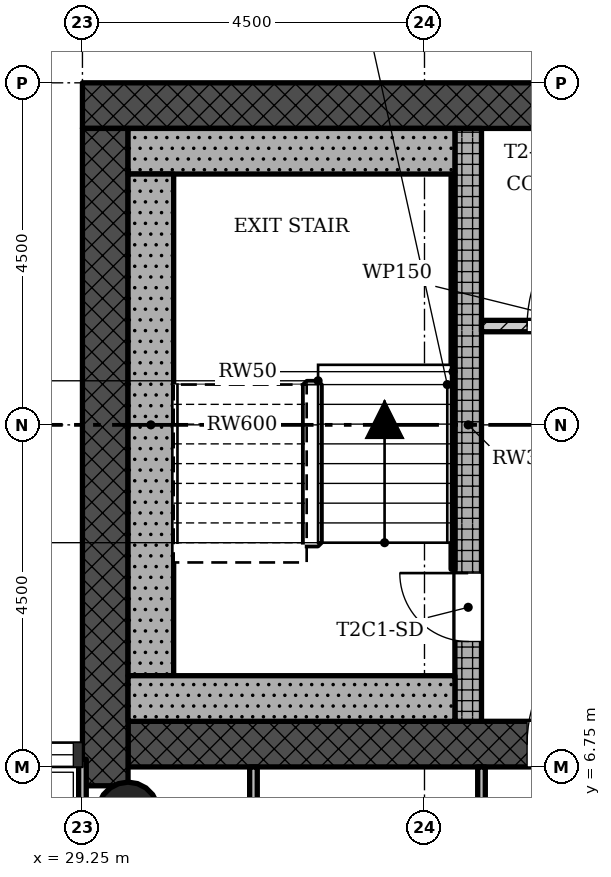
"""IFC4 building model, lengths in metres.
Left out: names, types, materials, properties, quantities, classifications, styles, units other than length and angle.
Written with IfcOpenShell. Run it as: python <this file> out.ifc"""

import sys

from ifc_helpers import new_model, si_unit, direction, frame, frame_2d, origin, origin_2d, place, context, subcontext, project, spatial, rectangle, hollow_circle, extrude, element, fill, save


model = new_model("IFC4")
c1 = context("Model", 3, precision=1e-05, world=origin(), true_north=direction((0.0, 1.0)))
c2 = subcontext(c1, "Body", "Model", "MODEL_VIEW")
j1 = project(units=[si_unit("LENGTHUNIT", "METRE"), si_unit("PLANEANGLEUNIT", "RADIAN")], contexts=[c1])
p1 = place(None, origin())
s1 = spatial("IfcSite", under=j1, at=p1, CompositionType="ELEMENT")
p2 = place(p1, origin())
s2 = spatial("IfcBuilding", under=s1, at=p2, CompositionType="ELEMENT")
p3 = place(p2, frame((0.0, 0.0, 209.6)))
s3 = spatial("IfcBuildingStorey", under=s2, at=p3, CompositionType="ELEMENT", Elevation=209.6)
p4 = place(p3, frame((29.85, 7.05, 0.0), z_axis=(0.0, 0.0, 1.0), x_axis=(1.0, 0.0, 0.0)))
e1 = element("IfcWall", 1, at=p4, inside=s3, PredefinedType="SHEAR", context=c2, shape_type="SweptSolid", body=[
    extrude(rectangle(XDim=12.9, YDim=0.6, at=frame_2d((6.45, 0.0))), origin(), (0.0, 0.0, 1.0), 3.4),
])
p5 = place(p4, frame((5.25, 0.0, 0.0)))
e2 = element("IfcOpeningElement", 2, at=p5, cuts=e1, PredefinedType="OPENING", context=c2, shape_type="SweptSolid", body=[
    extrude(rectangle(XDim=1.8, YDim=2.1, at=frame_2d((0.9, 1.05))), frame((0.0, 0.31, 0.0), z_axis=(0.0, -1.0, 0.0), x_axis=(1.0, 0.0, 0.0)), (0.0, 0.0, 1.0), 0.62),
])
p6 = place(p3, frame((42.15, 15.45, 0.0), z_axis=(0.0, 0.0, 1.0), x_axis=(-1.0, 0.0, 0.0)))
e3 = element("IfcWall", 3, at=p6, inside=s3, PredefinedType="SHEAR", context=c2, shape_type="SweptSolid", body=[
    extrude(rectangle(XDim=12.9, YDim=0.6, at=frame_2d((6.45, 0.0))), origin(), (0.0, 0.0, 1.0), 3.4),
])
p7 = place(p6, frame((5.7, 0.0, 0.45)))
e4 = element("IfcOpeningElement", 4, at=p7, cuts=e3, PredefinedType="OPENING", context=c2, shape_type="SweptSolid", body=[
    extrude(rectangle(XDim=0.9, YDim=2.4, at=frame_2d((0.45, 1.2))), frame((0.0, 0.31, 0.0), z_axis=(0.0, -1.0, 0.0), x_axis=(1.0, 0.0, 0.0)), (0.0, 0.0, 1.0), 0.62),
])
p8 = place(p3, frame((29.55, 15.15, 0.0), z_axis=(0.0, 0.0, 1.0), x_axis=(0.0, -1.0, 0.0)))
e5 = element("IfcWall", 5, at=p8, inside=s3, PredefinedType="SHEAR", context=c2, shape_type="SweptSolid", body=[
    extrude(rectangle(XDim=8.648, YDim=0.6, at=frame_2d((4.324, 0.0))), origin(), (0.0, 0.0, 1.0), 3.4),
])
p9 = place(p3, frame((34.325, 7.35, 0.0), z_axis=(0.0, 0.0, 1.0), x_axis=(0.0, 1.0, 0.0)))
e6 = element("IfcWall", 6, at=p9, inside=s3, PredefinedType="SHEAR", context=c2, shape_type="SweptSolid", body=[
    extrude(rectangle(XDim=7.8, YDim=0.35, at=frame_2d((3.9, 0.0))), origin(), (0.0, 0.0, 1.0), 3.4),
])
p10 = place(p9, frame((1.05, 0.0, 0.0)))
e7 = element("IfcOpeningElement", 7, at=p10, cuts=e6, PredefinedType="OPENING", context=c2, shape_type="SweptSolid", body=[
    extrude(rectangle(XDim=0.9, YDim=2.1, at=frame_2d((0.45, 1.05))), frame((0.0, 0.185, 0.0), z_axis=(0.0, -1.0, 0.0), x_axis=(1.0, 0.0, 0.0)), (0.0, 0.0, 1.0), 0.37),
])
p11 = place(p3, frame((29.85, 6.15, 0.0), z_axis=(0.0, 0.0, 1.0), x_axis=(1.0, 0.0, 0.0)))
e8 = element("IfcColumn", 8, at=p11, inside=s3, PredefinedType="COLUMN", context=c2, shape_type="SweptSolid", body=[
    extrude(hollow_circle(Radius=0.4, WallThickness=0.028, at=origin_2d()), origin(), (0.0, 0.0, 1.0), 3.4),
])
p12 = place(p3, frame((37.5, 12.55, 0.0), z_axis=(0.0, 0.0, 1.0), x_axis=(-1.0, 0.0, 0.0)))
e9 = element("IfcWall", 9, at=p12, inside=s3, PredefinedType="PARTITIONING", context=c2, shape_type="SweptSolid", body=[
    extrude(rectangle(XDim=3.0, YDim=0.15, at=frame_2d((1.5, 0.0))), origin(), (0.0, 0.0, 1.0), 3.0),
])
p13 = place(p12, frame((0.6, 0.0, 0.0)))
e10 = element("IfcOpeningElement", 10, at=p13, cuts=e9, PredefinedType="OPENING", context=c2, shape_type="SweptSolid", body=[
    extrude(rectangle(XDim=1.8, YDim=2.1, at=frame_2d((0.9, 1.05))), frame((0.0, 0.085, 0.0), z_axis=(0.0, -1.0, 0.0), x_axis=(1.0, 0.0, 0.0)), (0.0, 0.0, 1.0), 0.17),
])
p14 = place(p3, frame((34.5, 4.5, 0.0), z_axis=(0.0, 0.0, 1.0), x_axis=(0.0, 1.0, 0.0)))
e11 = element("IfcWall", 11, at=p14, inside=s3, PredefinedType="PARTITIONING", context=c2, shape_type="SweptSolid", body=[
    extrude(rectangle(XDim=2.25, YDim=0.1, at=frame_2d((1.125, 0.0))), origin(), (0.0, 0.0, 1.0), 3.0),
])
p15 = place(p3, frame((31.5, 0.9, 0.0), z_axis=(0.0, 0.0, 1.0), x_axis=(0.0, 1.0, 0.0)))
e12 = element("IfcWall", 12, at=p15, inside=s3, PredefinedType="PARTITIONING", context=c2, shape_type="SweptSolid", body=[
    extrude(rectangle(XDim=5.85, YDim=0.1, at=frame_2d((2.925, 0.0))), origin(), (0.0, 0.0, 1.0), 3.0),
])
p16 = place(p15, frame((1.35, 0.0, 0.0)))
e13 = element("IfcOpeningElement", 13, at=p16, cuts=e12, PredefinedType="OPENING", context=c2, shape_type="SweptSolid", body=[
    extrude(rectangle(XDim=0.9, YDim=2.1, at=frame_2d((0.45, 1.05))), frame((0.0, 0.06, 0.0), z_axis=(0.0, -1.0, 0.0), x_axis=(1.0, 0.0, 0.0)), (0.0, 0.0, 1.0), 0.12),
])
p17 = place(p3, frame((29.25, 0.9, 0.0), z_axis=(0.0, 0.0, 1.0), x_axis=(0.0, 1.0, 0.0)))
e14 = element("IfcWall", 14, at=p17, inside=s3, PredefinedType="PARTITIONING", context=c2, shape_type="SweptSolid", body=[
    extrude(rectangle(XDim=5.95, YDim=0.1, at=frame_2d((2.975, 0.0))), origin(), (0.0, 0.0, 1.0), 3.0),
])
p18 = place(p3, frame((34.15, 14.85, 0.0), z_axis=(0.0, 0.0, 1.0), x_axis=(-1.0, 0.0, 0.0)))
e15 = element("IfcWall", 15, at=p18, inside=s3, PredefinedType="SHEAR", context=c2, shape_type="SweptSolid", body=[
    extrude(rectangle(XDim=4.3, YDim=0.6, at=frame_2d((2.15, 0.0))), origin(), (0.0, 0.0, 1.0), 3.4),
])
p19 = place(p3, frame((30.15, 7.95, 0.0), z_axis=(0.0, 0.0, 1.0), x_axis=(0.0, 1.0, 0.0)))
e16 = element("IfcWall", 16, at=p19, inside=s3, PredefinedType="SHEAR", context=c2, shape_type="SweptSolid", body=[
    extrude(rectangle(XDim=6.6, YDim=0.6, at=frame_2d((3.3, 0.0))), origin(), (0.0, 0.0, 1.0), 3.4),
])
p20 = place(p3, frame((34.15, 7.65, 0.0), z_axis=(0.0, 0.0, 1.0), x_axis=(-1.0, 0.0, 0.0)))
e17 = element("IfcWall", 17, at=p20, inside=s3, PredefinedType="SHEAR", context=c2, shape_type="SweptSolid", body=[
    extrude(rectangle(XDim=4.3, YDim=0.6, at=frame_2d((2.15, 0.0))), origin(), (0.0, 0.0, 1.0), 3.4),
])
p21 = place(p3, frame((34.125, 9.35, 0.0), z_axis=(0.0, 0.0, 1.0), x_axis=(0.0, 1.0, 0.0)))
e18 = element("IfcWall", 18, at=p21, inside=s3, PredefinedType="SHEAR", context=c2, shape_type="SweptSolid", body=[
    extrude(rectangle(XDim=5.2, YDim=0.05, at=frame_2d((2.6, 0.0))), origin(), (0.0, 0.0, 1.0), 3.4),
])
p22 = place(p13, origin())
e19 = element("IfcDoor", 19, at=p22, inside=s3, OperationType="SINGLE_SWING_LEFT", PredefinedType="DOOR", context=c2, shape_type="SweptSolid", body=[
    extrude(rectangle(XDim=1.8, YDim=2.1, at=frame_2d((0.9, 1.05))), frame((0.0, 0.025, 0.0), z_axis=(0.0, -1.0, 0.0), x_axis=(1.0, 0.0, 0.0)), (0.0, 0.0, 1.0), 0.05),
])
fill(e10, e19)
p23 = place(p10, origin())
e20 = element("IfcDoor", 20, at=p23, inside=s3, OperationType="SINGLE_SWING_LEFT", PredefinedType="DOOR", context=c2, shape_type="SweptSolid", body=[
    extrude(rectangle(XDim=0.9, YDim=2.1, at=frame_2d((0.45, 1.05))), frame((0.0, 0.025, 0.0), z_axis=(0.0, -1.0, 0.0), x_axis=(1.0, 0.0, 0.0)), (0.0, 0.0, 1.0), 0.05),
])
fill(e7, e20)
p24 = place(p5, origin())
e21 = element("IfcDoor", 21, at=p24, inside=s3, OperationType="SINGLE_SWING_LEFT", PredefinedType="DOOR", context=c2, shape_type="SweptSolid", body=[
    extrude(rectangle(XDim=1.8, YDim=2.1, at=frame_2d((0.9, 1.05))), frame((0.0, 0.025, 0.0), z_axis=(0.0, -1.0, 0.0), x_axis=(1.0, 0.0, 0.0)), (0.0, 0.0, 1.0), 0.05),
])
fill(e2, e21)
save(model, sys.argv[1])
